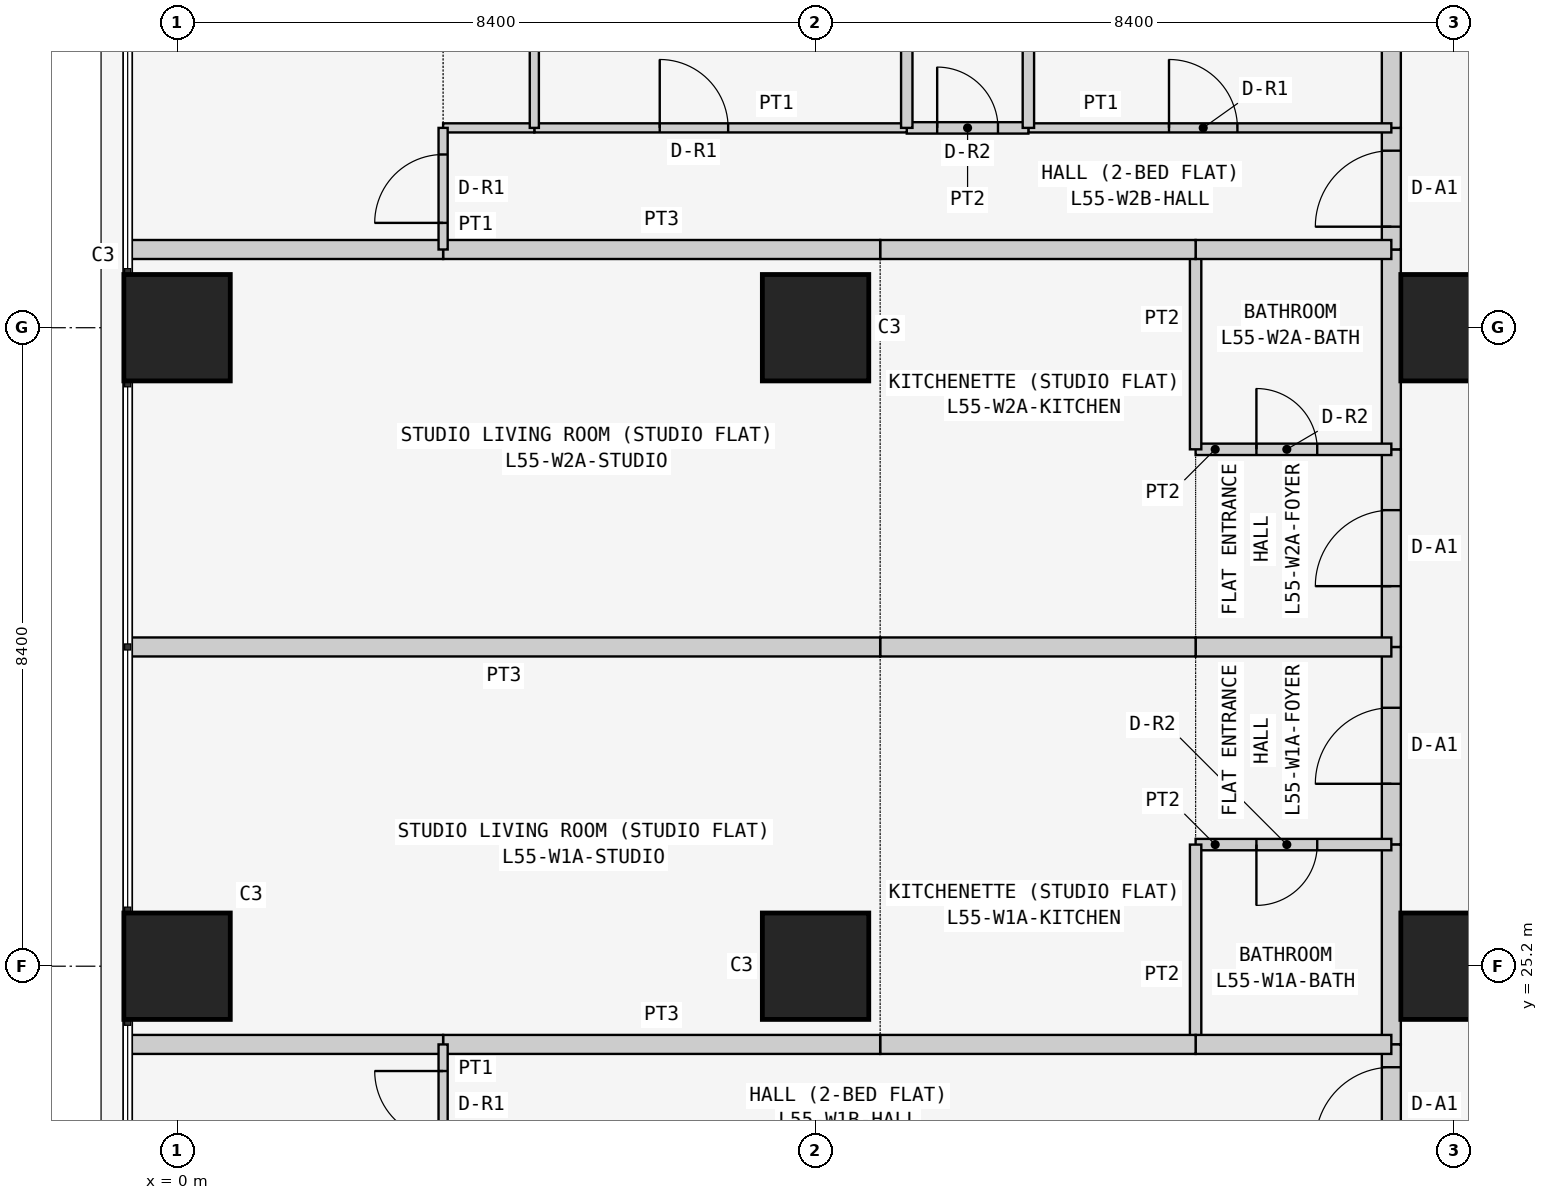
"""IFC4 building model, lengths in metres.
Left out: names, types, materials, properties, quantities, classifications, styles, units other than length and angle.
Written with IfcOpenShell. Run it as: python <this file> out.ifc"""

import sys

from ifc_helpers import new_model, si_unit, direction, frame, frame_2d, origin, origin_2d, place, context, subcontext, project, spatial, rectangle, extrude, element, fill, save


model = new_model("IFC4")
c1 = context("Model", 3, precision=1e-05, world=origin(), true_north=direction((0.0, 1.0)))
c2 = subcontext(c1, "Body", "Model", "MODEL_VIEW")
j1 = project(units=[si_unit("LENGTHUNIT", "METRE"), si_unit("PLANEANGLEUNIT", "RADIAN")], contexts=[c1])
p1 = place(None, origin())
s1 = spatial("IfcSite", under=j1, at=p1, CompositionType="ELEMENT")
p2 = place(p1, origin())
s2 = spatial("IfcBuilding", under=s1, at=p2, CompositionType="ELEMENT")
p3 = place(p2, frame((0.0, 0.0, 212.1)))
s3 = spatial("IfcBuildingStorey", under=s2, at=p3, CompositionType="ELEMENT", Elevation=212.1)
for number, where, z_axis, x_axis in (
    (1, (0.0, 25.2, 0.0), (0.0, 0.0, 1.0), (1.0, 0.0, 0.0)),
    (2, (0.0, 33.6, 0.0), (0.0, 0.0, 1.0), (1.0, 0.0, 0.0)),
    (3, (8.4, 25.2, 0.0), (0.0, 0.0, 1.0), (1.0, 0.0, 0.0)),
    (4, (8.4, 33.6, 0.0), (0.0, 0.0, 1.0), (1.0, 0.0, 0.0)),
    (5, (16.8, 25.2, 0.0), (0.0, 0.0, 1.0), (1.0, 0.0, 0.0)),
    (6, (16.8, 33.6, 0.0), (0.0, 0.0, 1.0), (1.0, 0.0, 0.0)),
):
    element("IfcColumn", number, at=place(p3, frame(where, z_axis=z_axis, x_axis=x_axis)), inside=s3, PredefinedType="COLUMN", context=c2, shape_type="SweptSolid", body=[
        extrude(rectangle(XDim=1.4, YDim=1.4, at=origin_2d()), origin(), (0.0, 0.0, 1.0), 3.6),
    ])
p4 = place(p3, frame((15.975, 26.8, 0.0), z_axis=(0.0, 0.0, 1.0), x_axis=(0.0, 1.0, 0.0)))
e7 = element("IfcWall", 7, at=p4, inside=s3, PredefinedType="PARTITIONING", context=c2, shape_type="SweptSolid", body=[
    extrude(rectangle(XDim=2.6, YDim=0.25, at=frame_2d((1.3, 0.0))), origin(), (0.0, 0.0, 1.0), 3.45),
])
p5 = place(p4, frame((0.8, 0.0, 0.0)))
e8 = element("IfcOpeningElement", 8, at=p5, cuts=e7, PredefinedType="OPENING", context=c2, shape_type="SweptSolid", body=[
    extrude(rectangle(XDim=1.0, YDim=2.1, at=frame_2d((0.5, 1.05))), frame((0.0, 0.135, 0.0), z_axis=(0.0, -1.0, 0.0), x_axis=(1.0, 0.0, 0.0)), (0.0, 0.0, 1.0), 0.27),
])
p6 = place(p3, frame((15.975, 24.171, 0.0), z_axis=(0.0, 0.0, 1.0), x_axis=(0.0, 1.0, 0.0)))
e9 = element("IfcWall", 9, at=p6, inside=s3, PredefinedType="PARTITIONING", context=c2, shape_type="SweptSolid", body=[
    extrude(rectangle(XDim=2.629, YDim=0.25, at=frame_2d((1.314, 0.0))), origin(), (0.0, 0.0, 1.0), 3.45),
])
p7 = place(p3, frame((15.975, 22.571, 0.0), z_axis=(0.0, 0.0, 1.0), x_axis=(0.0, 1.0, 0.0)))
e10 = element("IfcWall", 10, at=p7, inside=s3, PredefinedType="PARTITIONING", context=c2, shape_type="SweptSolid", body=[
    extrude(rectangle(XDim=1.6, YDim=0.25, at=frame_2d((0.8, 0.0))), origin(), (0.0, 0.0, 1.0), 3.45),
])
p8 = place(p7, frame((0.3, 0.0, 0.0)))
e11 = element("IfcOpeningElement", 11, at=p8, cuts=e10, PredefinedType="OPENING", context=c2, shape_type="SweptSolid", body=[
    extrude(rectangle(XDim=1.0, YDim=2.1, at=frame_2d((0.5, 1.05))), frame((0.0, 0.135, 0.0), z_axis=(0.0, -1.0, 0.0), x_axis=(1.0, 0.0, 0.0)), (0.0, 0.0, 1.0), 0.27),
])
p9 = place(p3, frame((15.975, 29.4, 0.0), z_axis=(0.0, 0.0, 1.0), x_axis=(0.0, 1.0, 0.0)))
e12 = element("IfcWall", 12, at=p9, inside=s3, PredefinedType="PARTITIONING", context=c2, shape_type="SweptSolid", body=[
    extrude(rectangle(XDim=2.6, YDim=0.25, at=frame_2d((1.3, 0.0))), origin(), (0.0, 0.0, 1.0), 3.45),
])
p10 = place(p9, frame((0.8, 0.0, 0.0)))
e13 = element("IfcOpeningElement", 13, at=p10, cuts=e12, PredefinedType="OPENING", context=c2, shape_type="SweptSolid", body=[
    extrude(rectangle(XDim=1.0, YDim=2.1, at=frame_2d((0.5, 1.05))), frame((0.0, 0.135, 0.0), z_axis=(0.0, -1.0, 0.0), x_axis=(1.0, 0.0, 0.0)), (0.0, 0.0, 1.0), 0.27),
])
p11 = place(p3, frame((15.975, 32.0, 0.0), z_axis=(0.0, 0.0, 1.0), x_axis=(0.0, 1.0, 0.0)))
e14 = element("IfcWall", 14, at=p11, inside=s3, PredefinedType="PARTITIONING", context=c2, shape_type="SweptSolid", body=[
    extrude(rectangle(XDim=2.629, YDim=0.25, at=frame_2d((1.314, 0.0))), origin(), (0.0, 0.0, 1.0), 3.45),
])
p12 = place(p3, frame((15.975, 34.629, 0.0), z_axis=(0.0, 0.0, 1.0), x_axis=(0.0, 1.0, 0.0)))
e15 = element("IfcWall", 15, at=p12, inside=s3, PredefinedType="PARTITIONING", context=c2, shape_type="SweptSolid", body=[
    extrude(rectangle(XDim=1.6, YDim=0.25, at=frame_2d((0.8, 0.0))), origin(), (0.0, 0.0, 1.0), 3.45),
])
p13 = place(p12, frame((0.3, 0.0, 0.0)))
e16 = element("IfcOpeningElement", 16, at=p13, cuts=e15, PredefinedType="OPENING", context=c2, shape_type="SweptSolid", body=[
    extrude(rectangle(XDim=1.0, YDim=2.1, at=frame_2d((0.5, 1.05))), frame((0.0, 0.135, 0.0), z_axis=(0.0, -1.0, 0.0), x_axis=(1.0, 0.0, 0.0)), (0.0, 0.0, 1.0), 0.27),
])
p14 = place(p3, frame((15.975, 36.229, 0.0), z_axis=(0.0, 0.0, 1.0), x_axis=(0.0, 1.0, 0.0)))
e17 = element("IfcWall", 17, at=p14, inside=s3, PredefinedType="PARTITIONING", context=c2, shape_type="SweptSolid", body=[
    extrude(rectangle(XDim=6.471, YDim=0.25, at=frame_2d((3.235, 0.0))), origin(), (0.0, 0.0, 1.0), 3.45),
])
p15 = place(p3, frame((13.4, 26.8, 0.0), z_axis=(0.0, 0.0, 1.0), x_axis=(1.0, 0.0, 0.0)))
e18 = element("IfcWall", 18, at=p15, inside=s3, PredefinedType="PARTITIONING", context=c2, shape_type="SweptSolid", body=[
    extrude(rectangle(XDim=2.575, YDim=0.15, at=frame_2d((1.288, 0.0))), origin(), (0.0, 0.0, 1.0), 3.45),
])
p16 = place(p15, frame((0.8, 0.0, 0.0)))
e19 = element("IfcOpeningElement", 19, at=p16, cuts=e18, PredefinedType="OPENING", context=c2, shape_type="SweptSolid", body=[
    extrude(rectangle(XDim=0.8, YDim=2.1, at=frame_2d((0.4, 1.05))), frame((0.0, 0.085, 0.0), z_axis=(0.0, -1.0, 0.0), x_axis=(1.0, 0.0, 0.0)), (0.0, 0.0, 1.0), 0.17),
])
p17 = place(p3, frame((15.975, 29.4, 0.0), z_axis=(0.0, 0.0, 1.0), x_axis=(-1.0, 0.0, 0.0)))
e20 = element("IfcWall", 20, at=p17, inside=s3, PredefinedType="PARTITIONING", context=c2, shape_type="SweptSolid", body=[
    extrude(rectangle(XDim=2.575, YDim=0.25, at=frame_2d((1.288, 0.0))), origin(), (0.0, 0.0, 1.0), 3.45),
])
p18 = place(p3, frame((13.4, 26.8, 0.0), z_axis=(0.0, 0.0, 1.0), x_axis=(0.0, -1.0, 0.0)))
e21 = element("IfcWall", 21, at=p18, inside=s3, PredefinedType="PARTITIONING", context=c2, shape_type="SweptSolid", body=[
    extrude(rectangle(XDim=2.629, YDim=0.15, at=frame_2d((1.314, 0.0))), origin(), (0.0, 0.0, 1.0), 3.45),
])
p19 = place(p3, frame((13.4, 24.171, 0.0), z_axis=(0.0, 0.0, 1.0), x_axis=(1.0, 0.0, 0.0)))
e22 = element("IfcWall", 22, at=p19, inside=s3, PredefinedType="PARTITIONING", context=c2, shape_type="SweptSolid", body=[
    extrude(rectangle(XDim=2.575, YDim=0.25, at=frame_2d((1.288, 0.0))), origin(), (0.0, 0.0, 1.0), 3.45),
])
for number, where, z_axis, x_axis in (
    (23, (9.25, 24.171, 0.0), (0.0, 0.0, 1.0), (1.0, 0.0, 0.0)),
    (24, (13.4, 29.4, 0.0), (0.0, 0.0, 1.0), (-1.0, 0.0, 0.0)),
):
    element("IfcWall", number, at=place(p3, frame(where, z_axis=z_axis, x_axis=x_axis)), inside=s3, PredefinedType="PARTITIONING", context=c2, shape_type="SweptSolid", body=[
        extrude(rectangle(XDim=4.15, YDim=0.25, at=frame_2d((2.075, 0.0))), origin(), (0.0, 0.0, 1.0), 3.45),
    ])
p20 = place(p3, frame((3.5, 24.171, 0.0), z_axis=(0.0, 0.0, 1.0), x_axis=(1.0, 0.0, 0.0)))
e25 = element("IfcWall", 25, at=p20, inside=s3, PredefinedType="PARTITIONING", context=c2, shape_type="SweptSolid", body=[
    extrude(rectangle(XDim=5.75, YDim=0.25, at=frame_2d((2.875, 0.0))), origin(), (0.0, 0.0, 1.0), 3.45),
])
p21 = place(p3, frame((-0.65, 24.171, 0.0), z_axis=(0.0, 0.0, 1.0), x_axis=(1.0, 0.0, 0.0)))
e26 = element("IfcWall", 26, at=p21, inside=s3, PredefinedType="PARTITIONING", context=c2, shape_type="SweptSolid", body=[
    extrude(rectangle(XDim=4.15, YDim=0.25, at=frame_2d((2.075, 0.0))), origin(), (0.0, 0.0, 1.0), 3.45),
])
p22 = place(p3, frame((9.25, 29.4, 0.0), z_axis=(0.0, 0.0, 1.0), x_axis=(-1.0, 0.0, 0.0)))
e27 = element("IfcWall", 27, at=p22, inside=s3, PredefinedType="PARTITIONING", context=c2, shape_type="SweptSolid", body=[
    extrude(rectangle(XDim=9.9, YDim=0.25, at=frame_2d((4.95, 0.0))), origin(), (0.0, 0.0, 1.0), 3.45),
])
p23 = place(p3, frame((3.5, 24.171, 0.0), z_axis=(0.0, 0.0, 1.0), x_axis=(0.0, -1.0, 0.0)))
e28 = element("IfcWall", 28, at=p23, inside=s3, PredefinedType="PARTITIONING", context=c2, shape_type="SweptSolid", body=[
    extrude(rectangle(XDim=1.6, YDim=0.12, at=frame_2d((0.8, 0.0))), origin(), (0.0, 0.0, 1.0), 3.45),
])
p24 = place(p23, frame((0.35, 0.0, 0.0)))
e29 = element("IfcOpeningElement", 29, at=p24, cuts=e28, PredefinedType="OPENING", context=c2, shape_type="SweptSolid", body=[
    extrude(rectangle(XDim=0.9, YDim=2.1, at=frame_2d((0.45, 1.05))), frame((0.0, 0.07, 0.0), z_axis=(0.0, -1.0, 0.0), x_axis=(1.0, 0.0, 0.0)), (0.0, 0.0, 1.0), 0.14),
])
p25 = place(p3, frame((13.4, 32.0, 0.0), z_axis=(0.0, 0.0, 1.0), x_axis=(1.0, 0.0, 0.0)))
e30 = element("IfcWall", 30, at=p25, inside=s3, PredefinedType="PARTITIONING", context=c2, shape_type="SweptSolid", body=[
    extrude(rectangle(XDim=2.575, YDim=0.15, at=frame_2d((1.288, 0.0))), origin(), (0.0, 0.0, 1.0), 3.45),
])
p26 = place(p25, frame((0.8, 0.0, 0.0)))
e31 = element("IfcOpeningElement", 31, at=p26, cuts=e30, PredefinedType="OPENING", context=c2, shape_type="SweptSolid", body=[
    extrude(rectangle(XDim=0.8, YDim=2.1, at=frame_2d((0.4, 1.05))), frame((0.0, 0.085, 0.0), z_axis=(0.0, -1.0, 0.0), x_axis=(1.0, 0.0, 0.0)), (0.0, 0.0, 1.0), 0.17),
])
p27 = place(p3, frame((13.4, 32.0, 0.0), z_axis=(0.0, 0.0, 1.0), x_axis=(0.0, 1.0, 0.0)))
e32 = element("IfcWall", 32, at=p27, inside=s3, PredefinedType="PARTITIONING", context=c2, shape_type="SweptSolid", body=[
    extrude(rectangle(XDim=2.629, YDim=0.15, at=frame_2d((1.314, 0.0))), origin(), (0.0, 0.0, 1.0), 3.45),
])
p28 = place(p3, frame((13.4, 34.629, 0.0), z_axis=(0.0, 0.0, 1.0), x_axis=(1.0, 0.0, 0.0)))
e33 = element("IfcWall", 33, at=p28, inside=s3, PredefinedType="PARTITIONING", context=c2, shape_type="SweptSolid", body=[
    extrude(rectangle(XDim=2.575, YDim=0.25, at=frame_2d((1.288, 0.0))), origin(), (0.0, 0.0, 1.0), 3.45),
])
p29 = place(p3, frame((9.25, 34.629, 0.0), z_axis=(0.0, 0.0, 1.0), x_axis=(1.0, 0.0, 0.0)))
e34 = element("IfcWall", 34, at=p29, inside=s3, PredefinedType="PARTITIONING", context=c2, shape_type="SweptSolid", body=[
    extrude(rectangle(XDim=4.15, YDim=0.25, at=frame_2d((2.075, 0.0))), origin(), (0.0, 0.0, 1.0), 3.45),
])
p30 = place(p3, frame((3.5, 34.629, 0.0), z_axis=(0.0, 0.0, 1.0), x_axis=(1.0, 0.0, 0.0)))
e35 = element("IfcWall", 35, at=p30, inside=s3, PredefinedType="PARTITIONING", context=c2, shape_type="SweptSolid", body=[
    extrude(rectangle(XDim=5.75, YDim=0.25, at=frame_2d((2.875, 0.0))), origin(), (0.0, 0.0, 1.0), 3.45),
])
p31 = place(p3, frame((-0.65, 34.629, 0.0), z_axis=(0.0, 0.0, 1.0), x_axis=(1.0, 0.0, 0.0)))
e36 = element("IfcWall", 36, at=p31, inside=s3, PredefinedType="PARTITIONING", context=c2, shape_type="SweptSolid", body=[
    extrude(rectangle(XDim=4.15, YDim=0.25, at=frame_2d((2.075, 0.0))), origin(), (0.0, 0.0, 1.0), 3.45),
])
p32 = place(p3, frame((11.2, 36.229, 0.0), z_axis=(0.0, 0.0, 1.0), x_axis=(1.0, 0.0, 0.0)))
e37 = element("IfcWall", 37, at=p32, inside=s3, PredefinedType="PARTITIONING", context=c2, shape_type="SweptSolid", body=[
    extrude(rectangle(XDim=4.775, YDim=0.12, at=frame_2d((2.388, 0.0))), origin(), (0.0, 0.0, 1.0), 3.45),
])
p33 = place(p32, frame((1.85, 0.0, 0.0)))
e38 = element("IfcOpeningElement", 38, at=p33, cuts=e37, PredefinedType="OPENING", context=c2, shape_type="SweptSolid", body=[
    extrude(rectangle(XDim=0.9, YDim=2.1, at=frame_2d((0.45, 1.05))), frame((0.0, 0.07, 0.0), z_axis=(0.0, -1.0, 0.0), x_axis=(1.0, 0.0, 0.0)), (0.0, 0.0, 1.0), 0.14),
])
p34 = place(p3, frame((9.6, 36.229, 0.0), z_axis=(0.0, 0.0, 1.0), x_axis=(1.0, 0.0, 0.0)))
e39 = element("IfcWall", 39, at=p34, inside=s3, PredefinedType="PARTITIONING", context=c2, shape_type="SweptSolid", body=[
    extrude(rectangle(XDim=1.6, YDim=0.15, at=frame_2d((0.8, 0.0))), origin(), (0.0, 0.0, 1.0), 3.45),
])
p35 = place(p34, frame((0.4, 0.0, 0.0)))
e40 = element("IfcOpeningElement", 40, at=p35, cuts=e39, PredefinedType="OPENING", context=c2, shape_type="SweptSolid", body=[
    extrude(rectangle(XDim=0.8, YDim=2.1, at=frame_2d((0.4, 1.05))), frame((0.0, 0.085, 0.0), z_axis=(0.0, -1.0, 0.0), x_axis=(1.0, 0.0, 0.0)), (0.0, 0.0, 1.0), 0.17),
])
p36 = place(p3, frame((4.7, 36.229, 0.0), z_axis=(0.0, 0.0, 1.0), x_axis=(1.0, 0.0, 0.0)))
e41 = element("IfcWall", 41, at=p36, inside=s3, PredefinedType="PARTITIONING", context=c2, shape_type="SweptSolid", body=[
    extrude(rectangle(XDim=4.9, YDim=0.12, at=frame_2d((2.45, 0.0))), origin(), (0.0, 0.0, 1.0), 3.45),
])
p37 = place(p36, frame((1.65, 0.0, 0.0)))
e42 = element("IfcOpeningElement", 42, at=p37, cuts=e41, PredefinedType="OPENING", context=c2, shape_type="SweptSolid", body=[
    extrude(rectangle(XDim=0.9, YDim=2.1, at=frame_2d((0.45, 1.05))), frame((0.0, 0.07, 0.0), z_axis=(0.0, -1.0, 0.0), x_axis=(1.0, 0.0, 0.0)), (0.0, 0.0, 1.0), 0.14),
])
p38 = place(p3, frame((3.5, 36.229, 0.0), z_axis=(0.0, 0.0, 1.0), x_axis=(1.0, 0.0, 0.0)))
e43 = element("IfcWall", 43, at=p38, inside=s3, PredefinedType="PARTITIONING", context=c2, shape_type="SweptSolid", body=[
    extrude(rectangle(XDim=1.2, YDim=0.12, at=frame_2d((0.6, 0.0))), origin(), (0.0, 0.0, 1.0), 3.45),
])
p39 = place(p3, frame((3.5, 34.629, 0.0), z_axis=(0.0, 0.0, 1.0), x_axis=(0.0, 1.0, 0.0)))
e44 = element("IfcWall", 44, at=p39, inside=s3, PredefinedType="PARTITIONING", context=c2, shape_type="SweptSolid", body=[
    extrude(rectangle(XDim=1.6, YDim=0.12, at=frame_2d((0.8, 0.0))), origin(), (0.0, 0.0, 1.0), 3.45),
])
p40 = place(p39, frame((0.35, 0.0, 0.0)))
e45 = element("IfcOpeningElement", 45, at=p40, cuts=e44, PredefinedType="OPENING", context=c2, shape_type="SweptSolid", body=[
    extrude(rectangle(XDim=0.9, YDim=2.1, at=frame_2d((0.45, 1.05))), frame((0.0, 0.07, 0.0), z_axis=(0.0, -1.0, 0.0), x_axis=(1.0, 0.0, 0.0)), (0.0, 0.0, 1.0), 0.14),
])
for number, where, z_axis, x_axis in (
    (46, (11.2, 36.229, 0.0), (0.0, 0.0, 1.0), (0.0, 1.0, 0.0)),
    (47, (9.6, 36.229, 0.0), (0.0, 0.0, 1.0), (0.0, 1.0, 0.0)),
):
    element("IfcWall", number, at=place(p3, frame(where, z_axis=z_axis, x_axis=x_axis)), inside=s3, PredefinedType="PARTITIONING", context=c2, shape_type="SweptSolid", body=[
        extrude(rectangle(XDim=6.471, YDim=0.15, at=frame_2d((3.235, 0.0))), origin(), (0.0, 0.0, 1.0), 3.45),
    ])
p41 = place(p3, frame((4.7, 36.229, 0.0), z_axis=(0.0, 0.0, 1.0), x_axis=(0.0, 1.0, 0.0)))
e48 = element("IfcWall", 48, at=p41, inside=s3, PredefinedType="PARTITIONING", context=c2, shape_type="SweptSolid", body=[
    extrude(rectangle(XDim=6.471, YDim=0.12, at=frame_2d((3.235, 0.0))), origin(), (0.0, 0.0, 1.0), 3.45),
])
p42 = place(p5, origin())
e49 = element("IfcDoor", 49, at=p42, inside=s3, OperationType="SINGLE_SWING_LEFT", PredefinedType="DOOR", context=c2, shape_type="SweptSolid", body=[
    extrude(rectangle(XDim=1.0, YDim=2.1, at=frame_2d((0.5, 1.05))), frame((0.0, 0.025, 0.0), z_axis=(0.0, -1.0, 0.0), x_axis=(1.0, 0.0, 0.0)), (0.0, 0.0, 1.0), 0.05),
])
fill(e8, e49)
p43 = place(p16, frame((0.8, 0.0, 0.0), z_axis=(0.0, 0.0, 1.0), x_axis=(-1.0, 0.0, 0.0)))
e50 = element("IfcDoor", 50, at=p43, inside=s3, OperationType="SINGLE_SWING_RIGHT", PredefinedType="DOOR", context=c2, shape_type="SweptSolid", body=[
    extrude(rectangle(XDim=0.8, YDim=2.1, at=frame_2d((0.4, 1.05))), frame((0.0, 0.025, 0.0), z_axis=(0.0, -1.0, 0.0), x_axis=(1.0, 0.0, 0.0)), (0.0, 0.0, 1.0), 0.05),
])
fill(e19, e50)
p44 = place(p8, origin())
e51 = element("IfcDoor", 51, at=p44, inside=s3, OperationType="SINGLE_SWING_LEFT", PredefinedType="DOOR", context=c2, shape_type="SweptSolid", body=[
    extrude(rectangle(XDim=1.0, YDim=2.1, at=frame_2d((0.5, 1.05))), frame((0.0, 0.025, 0.0), z_axis=(0.0, -1.0, 0.0), x_axis=(1.0, 0.0, 0.0)), (0.0, 0.0, 1.0), 0.05),
])
fill(e11, e51)
p45 = place(p24, frame((0.9, 0.0, 0.0), z_axis=(0.0, 0.0, 1.0), x_axis=(-1.0, 0.0, 0.0)))
e52 = element("IfcDoor", 52, at=p45, inside=s3, OperationType="SINGLE_SWING_RIGHT", PredefinedType="DOOR", context=c2, shape_type="SweptSolid", body=[
    extrude(rectangle(XDim=0.9, YDim=2.1, at=frame_2d((0.45, 1.05))), frame((0.0, 0.025, 0.0), z_axis=(0.0, -1.0, 0.0), x_axis=(1.0, 0.0, 0.0)), (0.0, 0.0, 1.0), 0.05),
])
fill(e29, e52)
p46 = place(p10, origin())
e53 = element("IfcDoor", 53, at=p46, inside=s3, OperationType="SINGLE_SWING_LEFT", PredefinedType="DOOR", context=c2, shape_type="SweptSolid", body=[
    extrude(rectangle(XDim=1.0, YDim=2.1, at=frame_2d((0.5, 1.05))), frame((0.0, 0.025, 0.0), z_axis=(0.0, -1.0, 0.0), x_axis=(1.0, 0.0, 0.0)), (0.0, 0.0, 1.0), 0.05),
])
fill(e13, e53)
p47 = place(p26, origin())
e54 = element("IfcDoor", 54, at=p47, inside=s3, OperationType="SINGLE_SWING_LEFT", PredefinedType="DOOR", context=c2, shape_type="SweptSolid", body=[
    extrude(rectangle(XDim=0.8, YDim=2.1, at=frame_2d((0.4, 1.05))), frame((0.0, 0.025, 0.0), z_axis=(0.0, -1.0, 0.0), x_axis=(1.0, 0.0, 0.0)), (0.0, 0.0, 1.0), 0.05),
])
fill(e31, e54)
p48 = place(p13, origin())
e55 = element("IfcDoor", 55, at=p48, inside=s3, OperationType="SINGLE_SWING_LEFT", PredefinedType="DOOR", context=c2, shape_type="SweptSolid", body=[
    extrude(rectangle(XDim=1.0, YDim=2.1, at=frame_2d((0.5, 1.05))), frame((0.0, 0.025, 0.0), z_axis=(0.0, -1.0, 0.0), x_axis=(1.0, 0.0, 0.0)), (0.0, 0.0, 1.0), 0.05),
])
fill(e16, e55)
p49 = place(p33, origin())
e56 = element("IfcDoor", 56, at=p49, inside=s3, OperationType="SINGLE_SWING_LEFT", PredefinedType="DOOR", context=c2, shape_type="SweptSolid", body=[
    extrude(rectangle(XDim=0.9, YDim=2.1, at=frame_2d((0.45, 1.05))), frame((0.0, 0.025, 0.0), z_axis=(0.0, -1.0, 0.0), x_axis=(1.0, 0.0, 0.0)), (0.0, 0.0, 1.0), 0.05),
])
fill(e38, e56)
p50 = place(p35, origin())
e57 = element("IfcDoor", 57, at=p50, inside=s3, OperationType="SINGLE_SWING_LEFT", PredefinedType="DOOR", context=c2, shape_type="SweptSolid", body=[
    extrude(rectangle(XDim=0.8, YDim=2.1, at=frame_2d((0.4, 1.05))), frame((0.0, 0.025, 0.0), z_axis=(0.0, -1.0, 0.0), x_axis=(1.0, 0.0, 0.0)), (0.0, 0.0, 1.0), 0.05),
])
fill(e40, e57)
p51 = place(p37, origin())
e58 = element("IfcDoor", 58, at=p51, inside=s3, OperationType="SINGLE_SWING_LEFT", PredefinedType="DOOR", context=c2, shape_type="SweptSolid", body=[
    extrude(rectangle(XDim=0.9, YDim=2.1, at=frame_2d((0.45, 1.05))), frame((0.0, 0.025, 0.0), z_axis=(0.0, -1.0, 0.0), x_axis=(1.0, 0.0, 0.0)), (0.0, 0.0, 1.0), 0.05),
])
fill(e42, e58)
p52 = place(p40, origin())
e59 = element("IfcDoor", 59, at=p52, inside=s3, OperationType="SINGLE_SWING_LEFT", PredefinedType="DOOR", context=c2, shape_type="SweptSolid", body=[
    extrude(rectangle(XDim=0.9, YDim=2.1, at=frame_2d((0.45, 1.05))), frame((0.0, 0.025, 0.0), z_axis=(0.0, -1.0, 0.0), x_axis=(1.0, 0.0, 0.0)), (0.0, 0.0, 1.0), 0.05),
])
fill(e45, e59)
save(model, sys.argv[1])
